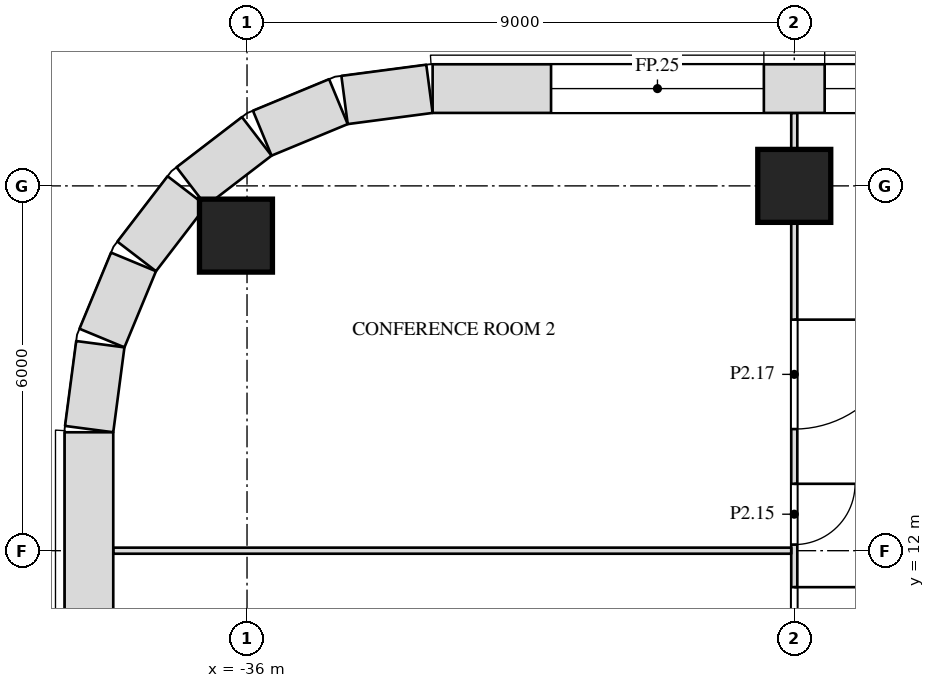
"""IFC4 building model, lengths in metres.
Left out: names, types, materials, properties, quantities, classifications, styles, units other than length and angle.
Written with IfcOpenShell. Run it as: python <this file> out.ifc"""

import sys

from ifc_helpers import new_model, si_unit, direction, frame, frame_2d, origin, origin_2d, place, context, subcontext, project, spatial, rectangle, extrude, element, fill, save


model = new_model("IFC4")
c1 = context("Model", 3, precision=1e-05, world=origin(), true_north=direction((0.0, 1.0)))
c2 = subcontext(c1, "Body", "Model", "MODEL_VIEW")
j1 = project(units=[si_unit("LENGTHUNIT", "METRE"), si_unit("PLANEANGLEUNIT", "RADIAN")], contexts=[c1])
p1 = place(None, origin())
s1 = spatial("IfcSite", under=j1, at=p1, CompositionType="ELEMENT")
p2 = place(p1, origin())
s2 = spatial("IfcBuilding", under=s1, at=p2, CompositionType="ELEMENT")
p3 = place(p2, frame((0.0, 0.0, 15.0)))
s3 = spatial("IfcBuildingStorey", under=s2, at=p3, CompositionType="ELEMENT", Elevation=15.0)
for number, where, z_axis, x_axis in (
    (1, (-36.182, 17.182, 0.0), (0.0, 0.0, 1.0), (1.0, 0.0, 0.0)),
    (2, (-27.0, 18.0, 0.0), (0.0, 0.0, 1.0), (1.0, 0.0, 0.0)),
):
    element("IfcColumn", number, at=place(p3, frame(where, z_axis=z_axis, x_axis=x_axis)), inside=s3, PredefinedType="COLUMN", context=c2, shape_type="SweptSolid", body=[
        extrude(rectangle(XDim=1.2, YDim=1.2, at=origin_2d()), origin(), (0.0, 0.0, 1.0), 6.0),
    ])
p4 = place(p3, frame((-27.0, 9.0, 0.0), z_axis=(0.0, 0.0, 1.0), x_axis=(0.0, 1.0, 0.0)))
e3 = element("IfcWall", 3, at=p4, inside=s3, PredefinedType="PARTITIONING", context=c2, shape_type="SweptSolid", body=[
    extrude(rectangle(XDim=8.4, YDim=0.1, at=frame_2d((4.2, 0.0))), origin(), (0.0, 0.0, 1.0), 5.088),
])
p5 = place(p4, frame((0.6, 0.0, 0.0)))
e4 = element("IfcOpeningElement", 4, at=p5, cuts=e3, PredefinedType="OPENING", context=c2, shape_type="SweptSolid", body=[
    extrude(rectangle(XDim=1.8, YDim=2.1, at=frame_2d((0.9, 1.05))), frame((0.0, 0.062, 0.0), z_axis=(0.0, -1.0, 0.0), x_axis=(1.0, 0.0, 0.0)), (0.0, 0.0, 1.0), 0.124),
])
p6 = place(p4, frame((3.1, 0.0, 0.0)))
e5 = element("IfcOpeningElement", 5, at=p6, cuts=e3, PredefinedType="OPENING", context=c2, shape_type="SweptSolid", body=[
    extrude(rectangle(XDim=1.0, YDim=2.1, at=frame_2d((0.5, 1.05))), frame((0.0, 0.062, 0.0), z_axis=(0.0, -1.0, 0.0), x_axis=(1.0, 0.0, 0.0)), (0.0, 0.0, 1.0), 0.124),
])
p7 = place(p4, frame((5.0, 0.0, 0.0)))
e6 = element("IfcOpeningElement", 6, at=p7, cuts=e3, PredefinedType="OPENING", context=c2, shape_type="SweptSolid", body=[
    extrude(rectangle(XDim=1.8, YDim=2.1, at=frame_2d((0.9, 1.05))), frame((0.0, 0.062, 0.0), z_axis=(0.0, -1.0, 0.0), x_axis=(1.0, 0.0, 0.0)), (0.0, 0.0, 1.0), 0.124),
])
p8 = place(p3, frame((-27.0, 18.6, 0.0), z_axis=(0.0, 0.0, 1.0), x_axis=(0.0, 1.0, 0.0)))
e7 = element("IfcWall", 7, at=p8, inside=s3, PredefinedType="PARTITIONING", context=c2, shape_type="SweptSolid", body=[
    extrude(rectangle(XDim=0.6, YDim=0.1, at=frame_2d((0.3, 0.0))), origin(), (0.0, 0.0, 1.0), 5.7),
])
p9 = place(p3, frame((-38.2, 12.0, 0.0), z_axis=(0.0, 0.0, 1.0), x_axis=(1.0, 0.0, 0.0)))
e8 = element("IfcWall", 8, at=p9, inside=s3, PredefinedType="PARTITIONING", context=c2, shape_type="SweptSolid", body=[
    extrude(rectangle(XDim=11.15, YDim=0.1, at=frame_2d((5.575, 0.0))), origin(), (0.0, 0.0, 1.0), 5.7),
])
p10 = place(p3, frame((-18.0, 19.6, 0.0), z_axis=(0.0, 0.0, 1.0), x_axis=(-1.0, 0.0, 0.0)))
e9 = element("IfcWall", 9, at=p10, inside=s3, PredefinedType="SOLIDWALL", context=c2, shape_type="SweptSolid", body=[
    extrude(rectangle(XDim=14.948, YDim=0.8, at=frame_2d((7.474, 0.0))), origin(), (0.0, 0.0, 1.0), 5.7),
])
p11 = place(p10, frame((0.5, 0.0, 1.0)))
e10 = element("IfcOpeningElement", 10, at=p11, cuts=e9, PredefinedType="OPENING", context=c2, shape_type="SweptSolid", body=[
    extrude(rectangle(XDim=3.5, YDim=4.0, at=frame_2d((1.75, 2.0))), frame((0.0, 0.412, 0.0), z_axis=(0.0, -1.0, 0.0), x_axis=(1.0, 0.0, 0.0)), (0.0, 0.0, 1.0), 0.824),
])
p12 = place(p10, frame((5.0, 0.0, 1.0)))
e11 = element("IfcOpeningElement", 11, at=p12, cuts=e9, PredefinedType="OPENING", context=c2, shape_type="SweptSolid", body=[
    extrude(rectangle(XDim=3.5, YDim=4.0, at=frame_2d((1.75, 2.0))), frame((0.0, 0.412, 0.0), z_axis=(0.0, -1.0, 0.0), x_axis=(1.0, 0.0, 0.0)), (0.0, 0.0, 1.0), 0.824),
])
p13 = place(p10, frame((9.5, 0.0, 1.0)))
e12 = element("IfcOpeningElement", 12, at=p13, cuts=e9, PredefinedType="OPENING", context=c2, shape_type="SweptSolid", body=[
    extrude(rectangle(XDim=3.5, YDim=4.0, at=frame_2d((1.75, 2.0))), frame((0.0, 0.412, 0.0), z_axis=(0.0, -1.0, 0.0), x_axis=(1.0, 0.0, 0.0)), (0.0, 0.0, 1.0), 0.824),
])
p14 = place(p3, frame((-33.0, 19.597, 0.0), z_axis=(0.0, 0.0, 1.0), x_axis=(-0.99144603414, -0.130517283865, 0.0)))
e13 = element("IfcWall", 13, at=p14, inside=s3, PredefinedType="SOLIDWALL", context=c2, shape_type="SweptSolid", body=[
    extrude(rectangle(XDim=1.408, YDim=0.8, at=frame_2d((0.704, 0.0))), origin(), (0.0, 0.0, 1.0), 5.7),
])
p15 = place(p3, frame((-34.497, 19.386, 0.0), z_axis=(0.0, 0.0, 1.0), x_axis=(-0.923847774587, -0.38276009378, 0.0)))
e14 = element("IfcWall", 14, at=p15, inside=s3, PredefinedType="SOLIDWALL", context=c2, shape_type="SweptSolid", body=[
    extrude(rectangle(XDim=1.355, YDim=0.8, at=frame_2d((0.678, 0.0))), origin(), (0.0, 0.0, 1.0), 5.7),
])
for number, where, z_axis, x_axis in (
    (15, (-35.84, 18.815, 0.0), (0.0, 0.0, 1.0), (-0.793, -0.609, 0.0)),
    (16, (-36.989, 17.916, 0.0), (0.0, 0.0, 1.0), (-0.609, -0.793, 0.0)),
):
    element("IfcWall", number, at=place(p3, frame(where, z_axis=z_axis, x_axis=x_axis)), inside=s3, PredefinedType="SOLIDWALL", context=c2, shape_type="SweptSolid", body=[
        extrude(rectangle(XDim=1.356, YDim=0.8, at=frame_2d((0.678, 0.0))), origin(), (0.0, 0.0, 1.0), 5.7),
    ])
p16 = place(p3, frame((-37.867, 16.75, 0.0), z_axis=(0.0, 0.0, 1.0), x_axis=(-0.38276009378, -0.923847774587, 0.0)))
e17 = element("IfcWall", 17, at=p16, inside=s3, PredefinedType="SOLIDWALL", context=c2, shape_type="SweptSolid", body=[
    extrude(rectangle(XDim=1.355, YDim=0.8, at=frame_2d((0.678, 0.0))), origin(), (0.0, 0.0, 1.0), 5.7),
])
p17 = place(p3, frame((-38.413, 15.396, 0.0), z_axis=(0.0, 0.0, 1.0), x_axis=(-0.130517283865, -0.99144603414, 0.0)))
e18 = element("IfcWall", 18, at=p17, inside=s3, PredefinedType="SOLIDWALL", context=c2, shape_type="SweptSolid", body=[
    extrude(rectangle(XDim=1.408, YDim=0.8, at=frame_2d((0.704, 0.0))), origin(), (0.0, 0.0, 1.0), 5.7),
])
p18 = place(p3, frame((-38.6, 13.948, 0.0), z_axis=(0.0, 0.0, 1.0), x_axis=(0.0, -1.0, 0.0)))
e19 = element("IfcWall", 19, at=p18, inside=s3, PredefinedType="SOLIDWALL", context=c2, shape_type="SweptSolid", body=[
    extrude(rectangle(XDim=35.895, YDim=0.8, at=frame_2d((17.948, 0.0))), origin(), (0.0, 0.0, 1.0), 5.7),
])
p19 = place(p18, frame((4.964, 0.0, 1.0)))
e20 = element("IfcOpeningElement", 20, at=p19, cuts=e19, PredefinedType="OPENING", context=c2, shape_type="SweptSolid", body=[
    extrude(rectangle(XDim=3.5, YDim=4.0, at=frame_2d((1.75, 2.0))), frame((0.0, 0.412, 0.0), z_axis=(0.0, -1.0, 0.0), x_axis=(1.0, 0.0, 0.0)), (0.0, 0.0, 1.0), 0.824),
])
p20 = place(p18, frame((9.458, 0.0, 1.0)))
e21 = element("IfcOpeningElement", 21, at=p20, cuts=e19, PredefinedType="OPENING", context=c2, shape_type="SweptSolid", body=[
    extrude(rectangle(XDim=3.5, YDim=4.0, at=frame_2d((1.75, 2.0))), frame((0.0, 0.412, 0.0), z_axis=(0.0, -1.0, 0.0), x_axis=(1.0, 0.0, 0.0)), (0.0, 0.0, 1.0), 0.824),
])
p21 = place(p18, frame((13.951, 0.0, 1.0)))
e22 = element("IfcOpeningElement", 22, at=p21, cuts=e19, PredefinedType="OPENING", context=c2, shape_type="SweptSolid", body=[
    extrude(rectangle(XDim=3.5, YDim=4.0, at=frame_2d((1.75, 2.0))), frame((0.0, 0.412, 0.0), z_axis=(0.0, -1.0, 0.0), x_axis=(1.0, 0.0, 0.0)), (0.0, 0.0, 1.0), 0.824),
])
p22 = place(p18, frame((18.444, 0.0, 1.0)))
e23 = element("IfcOpeningElement", 23, at=p22, cuts=e19, PredefinedType="OPENING", context=c2, shape_type="SweptSolid", body=[
    extrude(rectangle(XDim=3.5, YDim=4.0, at=frame_2d((1.75, 2.0))), frame((0.0, 0.412, 0.0), z_axis=(0.0, -1.0, 0.0), x_axis=(1.0, 0.0, 0.0)), (0.0, 0.0, 1.0), 0.824),
])
p23 = place(p18, frame((22.938, 0.0, 1.0)))
e24 = element("IfcOpeningElement", 24, at=p23, cuts=e19, PredefinedType="OPENING", context=c2, shape_type="SweptSolid", body=[
    extrude(rectangle(XDim=3.5, YDim=4.0, at=frame_2d((1.75, 2.0))), frame((0.0, 0.412, 0.0), z_axis=(0.0, -1.0, 0.0), x_axis=(1.0, 0.0, 0.0)), (0.0, 0.0, 1.0), 0.824),
])
p24 = place(p18, frame((27.431, 0.0, 1.0)))
e25 = element("IfcOpeningElement", 25, at=p24, cuts=e19, PredefinedType="OPENING", context=c2, shape_type="SweptSolid", body=[
    extrude(rectangle(XDim=3.5, YDim=4.0, at=frame_2d((1.75, 2.0))), frame((0.0, 0.412, 0.0), z_axis=(0.0, -1.0, 0.0), x_axis=(1.0, 0.0, 0.0)), (0.0, 0.0, 1.0), 0.824),
])
p25 = place(p5, origin())
e26 = element("IfcDoor", 26, at=p25, inside=s3, OperationType="DOUBLE_DOOR_SINGLE_SWING", PredefinedType="DOOR", context=c2, shape_type="SweptSolid", body=[
    extrude(rectangle(XDim=1.8, YDim=2.1, at=frame_2d((0.9, 1.05))), frame((0.0, 0.025, 0.0), z_axis=(0.0, -1.0, 0.0), x_axis=(1.0, 0.0, 0.0)), (0.0, 0.0, 1.0), 0.05),
])
fill(e4, e26)
p26 = place(p6, origin())
e27 = element("IfcDoor", 27, at=p26, inside=s3, OperationType="SINGLE_SWING_LEFT", PredefinedType="DOOR", context=c2, shape_type="SweptSolid", body=[
    extrude(rectangle(XDim=1.0, YDim=2.1, at=frame_2d((0.5, 1.05))), frame((0.0, 0.025, 0.0), z_axis=(0.0, -1.0, 0.0), x_axis=(1.0, 0.0, 0.0)), (0.0, 0.0, 1.0), 0.05),
])
fill(e5, e27)
p27 = place(p7, origin())
e28 = element("IfcDoor", 28, at=p27, inside=s3, OperationType="DOUBLE_DOOR_SINGLE_SWING", PredefinedType="DOOR", context=c2, shape_type="SweptSolid", body=[
    extrude(rectangle(XDim=1.8, YDim=2.1, at=frame_2d((0.9, 1.05))), frame((0.0, 0.025, 0.0), z_axis=(0.0, -1.0, 0.0), x_axis=(1.0, 0.0, 0.0)), (0.0, 0.0, 1.0), 0.05),
])
fill(e6, e28)
p28 = place(p12, origin())
e29 = element("IfcWindow", 29, at=p28, inside=s3, PartitioningType="SINGLE_PANEL", PredefinedType="WINDOW", context=c2, shape_type="SweptSolid", body=[
    extrude(rectangle(XDim=3.5, YDim=4.0, at=frame_2d((1.75, 2.0))), frame((0.0, 0.03, 0.0), z_axis=(0.0, -1.0, 0.0), x_axis=(1.0, 0.0, 0.0)), (0.0, 0.0, 1.0), 0.06),
])
fill(e11, e29)
p29 = place(p13, origin())
e30 = element("IfcWindow", 30, at=p29, inside=s3, PartitioningType="SINGLE_PANEL", PredefinedType="WINDOW", context=c2, shape_type="SweptSolid", body=[
    extrude(rectangle(XDim=3.5, YDim=4.0, at=frame_2d((1.75, 2.0))), frame((0.0, 0.03, 0.0), z_axis=(0.0, -1.0, 0.0), x_axis=(1.0, 0.0, 0.0)), (0.0, 0.0, 1.0), 0.06),
])
fill(e12, e30)
save(model, sys.argv[1])
